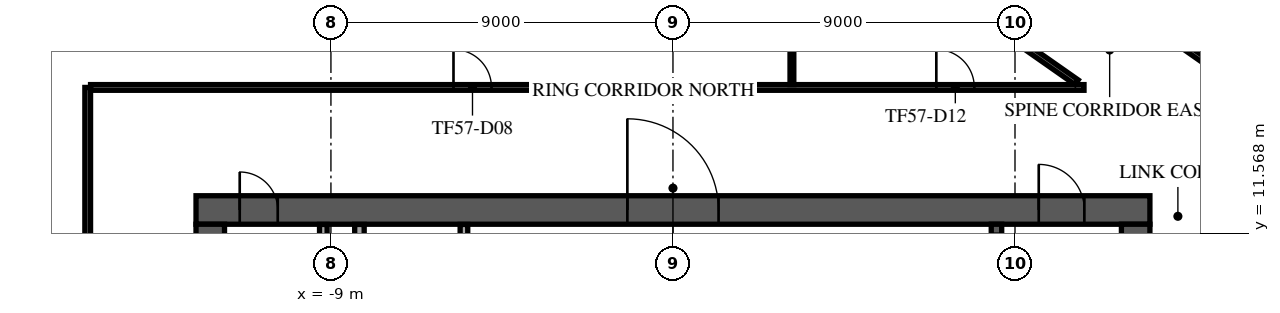
"""IFC4 building model, lengths in metres.
Left out: names, types, materials, properties, quantities, classifications, styles, units other than length and angle.
Written with IfcOpenShell. Run it as: python <this file> out.ifc"""

import sys

from ifc_helpers import new_model, si_unit, direction, frame, frame_2d, origin, place, context, subcontext, project, spatial, rectangle, extrude, element, fill, save


model = new_model("IFC4")
c1 = context("Model", 3, precision=1e-05, world=origin(), true_north=direction((0.0, 1.0)))
c2 = subcontext(c1, "Body", "Model", "MODEL_VIEW")
j1 = project(units=[si_unit("LENGTHUNIT", "METRE"), si_unit("PLANEANGLEUNIT", "RADIAN")], contexts=[c1])
p1 = place(None, origin())
s1 = spatial("IfcSite", under=j1, at=p1, CompositionType="ELEMENT")
p2 = place(p1, origin())
s2 = spatial("IfcBuilding", under=s1, at=p2, CompositionType="ELEMENT")
p3 = place(p2, frame((0.0, 0.0, 246.9)))
s3 = spatial("IfcBuildingStorey", under=s2, at=p3, CompositionType="ELEMENT", Elevation=246.9)
p4 = place(p3, frame((-12.55, 12.175, 0.0), z_axis=(0.0, 0.0, 1.0), x_axis=(1.0, 0.0, 0.0)))
e1 = element("IfcWall", 1, at=p4, inside=s3, PredefinedType="SHEAR", context=c2, shape_type="SweptSolid", body=[
    extrude(rectangle(XDim=25.1, YDim=0.75, at=frame_2d((12.55, 0.0))), origin(), (0.0, 0.0, 1.0), 3.64),
])
p5 = place(p4, frame((11.35, 0.0, 0.0)))
e2 = element("IfcOpeningElement", 2, at=p5, cuts=e1, PredefinedType="OPENING", context=c2, shape_type="SweptSolid", body=[
    extrude(rectangle(XDim=2.4, YDim=2.4, at=frame_2d((1.2, 1.2))), frame((0.0, 0.385, 0.0), z_axis=(0.0, -1.0, 0.0), x_axis=(1.0, 0.0, 0.0)), (0.0, 0.0, 1.0), 0.77),
])
p6 = place(p4, frame((22.175, 0.0, 0.0)))
e3 = element("IfcOpeningElement", 3, at=p6, cuts=e1, PredefinedType="OPENING", context=c2, shape_type="SweptSolid", body=[
    extrude(rectangle(XDim=1.2, YDim=2.1, at=frame_2d((0.6, 1.05))), frame((0.0, 0.385, 0.0), z_axis=(0.0, -1.0, 0.0), x_axis=(1.0, 0.0, 0.0)), (0.0, 0.0, 1.0), 0.77),
])
p7 = place(p4, frame((1.15, 0.0, 0.0)))
e4 = element("IfcOpeningElement", 4, at=p7, cuts=e1, PredefinedType="OPENING", context=c2, shape_type="SweptSolid", body=[
    extrude(rectangle(XDim=1.0, YDim=2.1, at=frame_2d((0.5, 1.05))), frame((0.0, 0.385, 0.0), z_axis=(0.0, -1.0, 0.0), x_axis=(1.0, 0.0, 0.0)), (0.0, 0.0, 1.0), 0.77),
])
p8 = place(p3, frame((12.175, -11.8, 0.0), z_axis=(0.0, 0.0, 1.0), x_axis=(0.0, 1.0, 0.0)))
e5 = element("IfcWall", 5, at=p8, inside=s3, PredefinedType="SHEAR", context=c2, shape_type="SweptSolid", body=[
    extrude(rectangle(XDim=23.6, YDim=0.75, at=frame_2d((11.8, 0.0))), origin(), (0.0, 0.0, 1.0), 3.64),
])
p9 = place(p8, frame((10.6, 0.0, 0.0)))
e6 = element("IfcOpeningElement", 6, at=p9, cuts=e5, PredefinedType="OPENING", context=c2, shape_type="SweptSolid", body=[
    extrude(rectangle(XDim=2.4, YDim=2.4, at=frame_2d((1.2, 1.2))), frame((0.0, 0.385, 0.0), z_axis=(0.0, -1.0, 0.0), x_axis=(1.0, 0.0, 0.0)), (0.0, 0.0, 1.0), 0.77),
])
p10 = place(p3, frame((-12.175, -11.8, 0.0), z_axis=(0.0, 0.0, 1.0), x_axis=(0.0, 1.0, 0.0)))
e7 = element("IfcWall", 7, at=p10, inside=s3, PredefinedType="SHEAR", context=c2, shape_type="SweptSolid", body=[
    extrude(rectangle(XDim=23.6, YDim=0.75, at=frame_2d((11.8, 0.0))), origin(), (0.0, 0.0, 1.0), 3.64),
])
p11 = place(p10, frame((10.6, 0.0, 0.0)))
e8 = element("IfcOpeningElement", 8, at=p11, cuts=e7, PredefinedType="OPENING", context=c2, shape_type="SweptSolid", body=[
    extrude(rectangle(XDim=2.4, YDim=2.4, at=frame_2d((1.2, 1.2))), frame((0.0, 0.385, 0.0), z_axis=(0.0, -1.0, 0.0), x_axis=(1.0, 0.0, 0.0)), (0.0, 0.0, 1.0), 0.77),
])
p12 = place(p3, frame((8.512, 4.55, 0.0), z_axis=(0.0, 0.0, 1.0), x_axis=(0.0, 1.0, 0.0)))
e9 = element("IfcWall", 9, at=p12, inside=s3, PredefinedType="SOLIDWALL", context=c2, shape_type="SweptSolid", body=[
    extrude(rectangle(XDim=7.25, YDim=0.275, at=frame_2d((3.625, 0.0))), origin(), (0.0, 0.0, 1.0), 3.64),
])
p13 = place(p12, frame((6.0, 0.0, 0.0)))
e10 = element("IfcOpeningElement", 10, at=p13, cuts=e9, PredefinedType="OPENING", context=c2, shape_type="SweptSolid", body=[
    extrude(rectangle(XDim=1.0, YDim=2.1, at=frame_2d((0.5, 1.05))), frame((0.0, 0.147, 0.0), z_axis=(0.0, -1.0, 0.0), x_axis=(1.0, 0.0, 0.0)), (0.0, 0.0, 1.0), 0.295),
])
p14 = place(p3, frame((-9.2, 4.78, 0.0), z_axis=(0.0, 0.0, 1.0), x_axis=(0.0, 1.0, 0.0)))
e11 = element("IfcWall", 11, at=p14, inside=s3, PredefinedType="PARTITIONING", context=c2, shape_type="SweptSolid", body=[
    extrude(rectangle(XDim=7.015, YDim=0.2, at=frame_2d((3.507, 0.0))), origin(), (0.0, 0.0, 1.0), 3.64),
])
p15 = place(p14, frame((2.92, 0.0, 0.0)))
e12 = element("IfcOpeningElement", 12, at=p15, cuts=e11, PredefinedType="OPENING", context=c2, shape_type="SweptSolid", body=[
    extrude(rectangle(XDim=1.0, YDim=2.1, at=frame_2d((0.5, 1.05))), frame((0.0, 0.11, 0.0), z_axis=(0.0, -1.0, 0.0), x_axis=(1.0, 0.0, 0.0)), (0.0, 0.0, 1.0), 0.22),
])
p16 = place(p3, frame((-8.25, 8.805, 0.0), z_axis=(0.0, 0.0, 1.0), x_axis=(0.0, 1.0, 0.0)))
e13 = element("IfcWall", 13, at=p16, inside=s3, PredefinedType="PARTITIONING", context=c2, shape_type="SweptSolid", body=[
    extrude(rectangle(XDim=2.99, YDim=0.25, at=frame_2d((1.495, 0.0))), origin(), (0.0, 0.0, 1.0), 3.64),
])
p17 = place(p16, frame((0.895, 0.0, 0.0)))
e14 = element("IfcOpeningElement", 14, at=p17, cuts=e13, PredefinedType="OPENING", context=c2, shape_type="SweptSolid", body=[
    extrude(rectangle(XDim=1.0, YDim=2.1, at=frame_2d((0.5, 1.05))), frame((0.0, 0.135, 0.0), z_axis=(0.0, -1.0, 0.0), x_axis=(1.0, 0.0, 0.0)), (0.0, 0.0, 1.0), 0.27),
])
p18 = place(p3, frame((-5.5, 8.805, 0.0), z_axis=(0.0, 0.0, 1.0), x_axis=(0.0, 1.0, 0.0)))
e15 = element("IfcWall", 15, at=p18, inside=s3, PredefinedType="PARTITIONING", context=c2, shape_type="SweptSolid", body=[
    extrude(rectangle(XDim=2.99, YDim=0.2, at=frame_2d((1.495, 0.0))), origin(), (0.0, 0.0, 1.0), 3.64),
])
p19 = place(p18, frame((0.532, 0.0, 0.0)))
e16 = element("IfcOpeningElement", 16, at=p19, cuts=e15, PredefinedType="OPENING", context=c2, shape_type="SweptSolid", body=[
    extrude(rectangle(XDim=1.8, YDim=2.1, at=frame_2d((0.9, 1.05))), frame((0.0, 0.11, 0.0), z_axis=(0.0, -1.0, 0.0), x_axis=(1.0, 0.0, 0.0)), (0.0, 0.0, 1.0), 0.22),
])
p20 = place(p3, frame((-5.115, 33.491, 0.0), z_axis=(0.0, 0.0, 1.0), x_axis=(-0.57357740375, -0.819151366908, 0.0)))
e17 = element("IfcWall", 17, at=p20, inside=s3, PredefinedType="STANDARD", context=c2, shape_type="SweptSolid", body=[
    extrude(rectangle(XDim=48.843, YDim=0.6, at=frame_2d((24.422, 0.0))), origin(), (0.0, 0.0, 1.0), 3.64),
])
p21 = place(p20, frame((1.22, 0.0, 0.9)))
e18 = element("IfcOpeningElement", 18, at=p21, cuts=e17, PredefinedType="OPENING", context=c2, shape_type="SweptSolid", body=[
    extrude(rectangle(XDim=2.0, YDim=2.1, at=frame_2d((1.0, 1.05))), frame((0.0, 0.31, 0.0), z_axis=(0.0, -1.0, 0.0), x_axis=(1.0, 0.0, 0.0)), (0.0, 0.0, 1.0), 0.62),
])
p22 = place(p20, frame((5.66, 0.0, 0.9)))
e19 = element("IfcOpeningElement", 19, at=p22, cuts=e17, PredefinedType="OPENING", context=c2, shape_type="SweptSolid", body=[
    extrude(rectangle(XDim=2.0, YDim=2.1, at=frame_2d((1.0, 1.05))), frame((0.0, 0.31, 0.0), z_axis=(0.0, -1.0, 0.0), x_axis=(1.0, 0.0, 0.0)), (0.0, 0.0, 1.0), 0.62),
])
p23 = place(p20, frame((10.101, 0.0, 0.9)))
e20 = element("IfcOpeningElement", 20, at=p23, cuts=e17, PredefinedType="OPENING", context=c2, shape_type="SweptSolid", body=[
    extrude(rectangle(XDim=2.0, YDim=2.1, at=frame_2d((1.0, 1.05))), frame((0.0, 0.31, 0.0), z_axis=(0.0, -1.0, 0.0), x_axis=(1.0, 0.0, 0.0)), (0.0, 0.0, 1.0), 0.62),
])
p24 = place(p20, frame((14.541, 0.0, 0.9)))
e21 = element("IfcOpeningElement", 21, at=p24, cuts=e17, PredefinedType="OPENING", context=c2, shape_type="SweptSolid", body=[
    extrude(rectangle(XDim=2.0, YDim=2.1, at=frame_2d((1.0, 1.05))), frame((0.0, 0.31, 0.0), z_axis=(0.0, -1.0, 0.0), x_axis=(1.0, 0.0, 0.0)), (0.0, 0.0, 1.0), 0.62),
])
p25 = place(p20, frame((18.981, 0.0, 0.9)))
e22 = element("IfcOpeningElement", 22, at=p25, cuts=e17, PredefinedType="OPENING", context=c2, shape_type="SweptSolid", body=[
    extrude(rectangle(XDim=2.0, YDim=2.1, at=frame_2d((1.0, 1.05))), frame((0.0, 0.31, 0.0), z_axis=(0.0, -1.0, 0.0), x_axis=(1.0, 0.0, 0.0)), (0.0, 0.0, 1.0), 0.62),
])
p26 = place(p20, frame((23.422, 0.0, 0.9)))
e23 = element("IfcOpeningElement", 23, at=p26, cuts=e17, PredefinedType="OPENING", context=c2, shape_type="SweptSolid", body=[
    extrude(rectangle(XDim=2.0, YDim=2.1, at=frame_2d((1.0, 1.05))), frame((0.0, 0.31, 0.0), z_axis=(0.0, -1.0, 0.0), x_axis=(1.0, 0.0, 0.0)), (0.0, 0.0, 1.0), 0.62),
])
p27 = place(p20, frame((27.862, 0.0, 0.9)))
e24 = element("IfcOpeningElement", 24, at=p27, cuts=e17, PredefinedType="OPENING", context=c2, shape_type="SweptSolid", body=[
    extrude(rectangle(XDim=2.0, YDim=2.1, at=frame_2d((1.0, 1.05))), frame((0.0, 0.31, 0.0), z_axis=(0.0, -1.0, 0.0), x_axis=(1.0, 0.0, 0.0)), (0.0, 0.0, 1.0), 0.62),
])
p28 = place(p20, frame((32.302, 0.0, 0.9)))
e25 = element("IfcOpeningElement", 25, at=p28, cuts=e17, PredefinedType="OPENING", context=c2, shape_type="SweptSolid", body=[
    extrude(rectangle(XDim=2.0, YDim=2.1, at=frame_2d((1.0, 1.05))), frame((0.0, 0.31, 0.0), z_axis=(0.0, -1.0, 0.0), x_axis=(1.0, 0.0, 0.0)), (0.0, 0.0, 1.0), 0.62),
])
p29 = place(p20, frame((36.742, 0.0, 0.9)))
e26 = element("IfcOpeningElement", 26, at=p29, cuts=e17, PredefinedType="OPENING", context=c2, shape_type="SweptSolid", body=[
    extrude(rectangle(XDim=2.0, YDim=2.1, at=frame_2d((1.0, 1.05))), frame((0.0, 0.31, 0.0), z_axis=(0.0, -1.0, 0.0), x_axis=(1.0, 0.0, 0.0)), (0.0, 0.0, 1.0), 0.62),
])
p30 = place(p20, frame((41.183, 0.0, 0.9)))
e27 = element("IfcOpeningElement", 27, at=p30, cuts=e17, PredefinedType="OPENING", context=c2, shape_type="SweptSolid", body=[
    extrude(rectangle(XDim=2.0, YDim=2.1, at=frame_2d((1.0, 1.05))), frame((0.0, 0.31, 0.0), z_axis=(0.0, -1.0, 0.0), x_axis=(1.0, 0.0, 0.0)), (0.0, 0.0, 1.0), 0.62),
])
p31 = place(p20, frame((45.623, 0.0, 0.9)))
e28 = element("IfcOpeningElement", 28, at=p31, cuts=e17, PredefinedType="OPENING", context=c2, shape_type="SweptSolid", body=[
    extrude(rectangle(XDim=2.0, YDim=2.1, at=frame_2d((1.0, 1.05))), frame((0.0, 0.31, 0.0), z_axis=(0.0, -1.0, 0.0), x_axis=(1.0, 0.0, 0.0)), (0.0, 0.0, 1.0), 0.62),
])
p32 = place(p3, frame((31.815, 13.98, 0.0), z_axis=(0.0, 0.0, 1.0), x_axis=(-0.819152162902, 0.573576266955, 0.0)))
e29 = element("IfcWall", 29, at=p32, inside=s3, PredefinedType="STANDARD", context=c2, shape_type="SweptSolid", body=[
    extrude(rectangle(XDim=36.243, YDim=0.6, at=frame_2d((18.122, 0.0))), origin(), (0.0, 0.0, 1.0), 3.64),
])
p33 = place(p32, frame((1.215, 0.0, 0.9)))
e30 = element("IfcOpeningElement", 30, at=p33, cuts=e29, PredefinedType="OPENING", context=c2, shape_type="SweptSolid", body=[
    extrude(rectangle(XDim=2.1, YDim=2.1, at=frame_2d((1.05, 1.05))), frame((0.0, 0.31, 0.0), z_axis=(0.0, -1.0, 0.0), x_axis=(1.0, 0.0, 0.0)), (0.0, 0.0, 1.0), 0.62),
])
p34 = place(p32, frame((5.746, 0.0, 0.9)))
e31 = element("IfcOpeningElement", 31, at=p34, cuts=e29, PredefinedType="OPENING", context=c2, shape_type="SweptSolid", body=[
    extrude(rectangle(XDim=2.1, YDim=2.1, at=frame_2d((1.05, 1.05))), frame((0.0, 0.31, 0.0), z_axis=(0.0, -1.0, 0.0), x_axis=(1.0, 0.0, 0.0)), (0.0, 0.0, 1.0), 0.62),
])
p35 = place(p32, frame((10.276, 0.0, 0.9)))
e32 = element("IfcOpeningElement", 32, at=p35, cuts=e29, PredefinedType="OPENING", context=c2, shape_type="SweptSolid", body=[
    extrude(rectangle(XDim=2.1, YDim=2.1, at=frame_2d((1.05, 1.05))), frame((0.0, 0.31, 0.0), z_axis=(0.0, -1.0, 0.0), x_axis=(1.0, 0.0, 0.0)), (0.0, 0.0, 1.0), 0.62),
])
p36 = place(p32, frame((14.806, 0.0, 0.9)))
e33 = element("IfcOpeningElement", 33, at=p36, cuts=e29, PredefinedType="OPENING", context=c2, shape_type="SweptSolid", body=[
    extrude(rectangle(XDim=2.1, YDim=2.1, at=frame_2d((1.05, 1.05))), frame((0.0, 0.31, 0.0), z_axis=(0.0, -1.0, 0.0), x_axis=(1.0, 0.0, 0.0)), (0.0, 0.0, 1.0), 0.62),
])
p37 = place(p32, frame((19.337, 0.0, 0.9)))
e34 = element("IfcOpeningElement", 34, at=p37, cuts=e29, PredefinedType="OPENING", context=c2, shape_type="SweptSolid", body=[
    extrude(rectangle(XDim=2.1, YDim=2.1, at=frame_2d((1.05, 1.05))), frame((0.0, 0.31, 0.0), z_axis=(0.0, -1.0, 0.0), x_axis=(1.0, 0.0, 0.0)), (0.0, 0.0, 1.0), 0.62),
])
p38 = place(p32, frame((23.867, 0.0, 0.9)))
e35 = element("IfcOpeningElement", 35, at=p38, cuts=e29, PredefinedType="OPENING", context=c2, shape_type="SweptSolid", body=[
    extrude(rectangle(XDim=2.1, YDim=2.1, at=frame_2d((1.05, 1.05))), frame((0.0, 0.31, 0.0), z_axis=(0.0, -1.0, 0.0), x_axis=(1.0, 0.0, 0.0)), (0.0, 0.0, 1.0), 0.62),
])
p39 = place(p32, frame((28.398, 0.0, 0.9)))
e36 = element("IfcOpeningElement", 36, at=p39, cuts=e29, PredefinedType="OPENING", context=c2, shape_type="SweptSolid", body=[
    extrude(rectangle(XDim=2.1, YDim=2.1, at=frame_2d((1.05, 1.05))), frame((0.0, 0.31, 0.0), z_axis=(0.0, -1.0, 0.0), x_axis=(1.0, 0.0, 0.0)), (0.0, 0.0, 1.0), 0.62),
])
p40 = place(p32, frame((32.928, 0.0, 0.9)))
e37 = element("IfcOpeningElement", 37, at=p40, cuts=e29, PredefinedType="OPENING", context=c2, shape_type="SweptSolid", body=[
    extrude(rectangle(XDim=2.1, YDim=2.1, at=frame_2d((1.05, 1.05))), frame((0.0, 0.31, 0.0), z_axis=(0.0, -1.0, 0.0), x_axis=(1.0, 0.0, 0.0)), (0.0, 0.0, 1.0), 0.62),
])
p41 = place(p3, frame((-15.4, -12.046, 0.0), z_axis=(0.0, 0.0, 1.0), x_axis=(0.0, 1.0, 0.0)))
e38 = element("IfcWall", 38, at=p41, inside=s3, PredefinedType="PARTITIONING", context=c2, shape_type="SweptSolid", body=[
    extrude(rectangle(XDim=27.446, YDim=0.15, at=frame_2d((13.723, 0.0))), origin(), (0.0, 0.0, 1.0), 3.24),
])
p42 = place(p41, frame((12.961, 0.0, 0.0)))
e39 = element("IfcOpeningElement", 39, at=p42, cuts=e38, PredefinedType="OPENING", context=c2, shape_type="SweptSolid", body=[
    extrude(rectangle(XDim=1.0, YDim=2.1, at=frame_2d((0.5, 1.05))), frame((0.0, 0.085, 0.0), z_axis=(0.0, -1.0, 0.0), x_axis=(1.0, 0.0, 0.0)), (0.0, 0.0, 1.0), 0.17),
])
p43 = place(p3, frame((-15.325, 15.4, 0.0), z_axis=(0.0, 0.0, 1.0), x_axis=(1.0, 0.0, 0.0)))
e40 = element("IfcWall", 40, at=p43, inside=s3, PredefinedType="PARTITIONING", context=c2, shape_type="SweptSolid", body=[
    extrude(rectangle(XDim=26.141, YDim=0.15, at=frame_2d((13.07, 0.0))), origin(), (0.0, 0.0, 1.0), 3.24),
])
p44 = place(p43, frame((9.55, 0.0, 0.0)))
e41 = element("IfcOpeningElement", 41, at=p44, cuts=e40, PredefinedType="OPENING", context=c2, shape_type="SweptSolid", body=[
    extrude(rectangle(XDim=1.0, YDim=2.1, at=frame_2d((0.5, 1.05))), frame((0.0, 0.085, 0.0), z_axis=(0.0, -1.0, 0.0), x_axis=(1.0, 0.0, 0.0)), (0.0, 0.0, 1.0), 0.17),
])
p45 = place(p43, frame((22.255, 0.0, 0.0)))
e42 = element("IfcOpeningElement", 42, at=p45, cuts=e40, PredefinedType="OPENING", context=c2, shape_type="SweptSolid", body=[
    extrude(rectangle(XDim=1.0, YDim=2.1, at=frame_2d((0.5, 1.05))), frame((0.0, 0.085, 0.0), z_axis=(0.0, -1.0, 0.0), x_axis=(1.0, 0.0, 0.0)), (0.0, 0.0, 1.0), 0.17),
])
p46 = place(p3, frame((-3.266, 25.26, 0.0), z_axis=(0.0, 0.0, 1.0), x_axis=(0.819150723298, -0.573578322917, 0.0)))
e43 = element("IfcWall", 43, at=p46, inside=s3, PredefinedType="PARTITIONING", context=c2, shape_type="SweptSolid", body=[
    extrude(rectangle(XDim=16.953, YDim=0.15, at=frame_2d((8.476, 0.0))), origin(), (0.0, 0.0, 1.0), 3.24),
])
p47 = place(p46, frame((2.55, 0.0, 0.0)))
e44 = element("IfcOpeningElement", 44, at=p47, cuts=e43, PredefinedType="OPENING", context=c2, shape_type="SweptSolid", body=[
    extrude(rectangle(XDim=1.8, YDim=2.1, at=frame_2d((0.9, 1.05))), frame((0.0, 0.085, 0.0), z_axis=(0.0, -1.0, 0.0), x_axis=(1.0, 0.0, 0.0)), (0.0, 0.0, 1.0), 0.17),
])
p48 = place(p3, frame((-1.89, 27.226, 0.0), z_axis=(0.0, 0.0, 1.0), x_axis=(0.819163235761, -0.573560452941, 0.0)))
e45 = element("IfcWall", 45, at=p48, inside=s3, PredefinedType="PARTITIONING", context=c2, shape_type="SweptSolid", body=[
    extrude(rectangle(XDim=34.403, YDim=0.15, at=frame_2d((17.202, 0.0))), origin(), (0.0, 0.0, 1.0), 3.24),
])
p49 = place(p48, frame((7.427, 0.0, 0.0)))
e46 = element("IfcOpeningElement", 46, at=p49, cuts=e45, PredefinedType="OPENING", context=c2, shape_type="SweptSolid", body=[
    extrude(rectangle(XDim=1.0, YDim=2.1, at=frame_2d((0.5, 1.05))), frame((0.0, 0.085, 0.0), z_axis=(0.0, -1.0, 0.0), x_axis=(1.0, 0.0, 0.0)), (0.0, 0.0, 1.0), 0.17),
])
p50 = place(p48, frame((15.173, 0.0, 0.0)))
e47 = element("IfcOpeningElement", 47, at=p50, cuts=e45, PredefinedType="OPENING", context=c2, shape_type="SweptSolid", body=[
    extrude(rectangle(XDim=1.0, YDim=2.1, at=frame_2d((0.5, 1.05))), frame((0.0, 0.085, 0.0), z_axis=(0.0, -1.0, 0.0), x_axis=(1.0, 0.0, 0.0)), (0.0, 0.0, 1.0), 0.17),
])
p51 = place(p48, frame((19.273, 0.0, 0.0)))
e48 = element("IfcOpeningElement", 48, at=p51, cuts=e45, PredefinedType="OPENING", context=c2, shape_type="SweptSolid", body=[
    extrude(rectangle(XDim=1.0, YDim=2.1, at=frame_2d((0.5, 1.05))), frame((0.0, 0.085, 0.0), z_axis=(0.0, -1.0, 0.0), x_axis=(1.0, 0.0, 0.0)), (0.0, 0.0, 1.0), 0.17),
])
p52 = place(p3, frame((3.13, 15.475, 0.0), z_axis=(0.0, 0.0, 1.0), x_axis=(0.0, 1.0, 0.0)))
e49 = element("IfcWall", 49, at=p52, inside=s3, PredefinedType="PARTITIONING", context=c2, shape_type="SweptSolid", body=[
    extrude(rectangle(XDim=3.731, YDim=0.1, at=frame_2d((1.865, 0.0))), origin(), (0.0, 0.0, 1.0), 3.64),
])
p53 = place(p5, origin())
e50 = element("IfcDoor", 50, at=p53, inside=s3, OperationType="SINGLE_SWING_LEFT", PredefinedType="DOOR", context=c2, shape_type="SweptSolid", body=[
    extrude(rectangle(XDim=2.4, YDim=2.4, at=frame_2d((1.2, 1.2))), frame((0.0, 0.025, 0.0), z_axis=(0.0, -1.0, 0.0), x_axis=(1.0, 0.0, 0.0)), (0.0, 0.0, 1.0), 0.05),
])
fill(e2, e50)
p54 = place(p6, origin())
e51 = element("IfcDoor", 51, at=p54, inside=s3, OperationType="SINGLE_SWING_LEFT", PredefinedType="DOOR", context=c2, shape_type="SweptSolid", body=[
    extrude(rectangle(XDim=1.2, YDim=2.1, at=frame_2d((0.6, 1.05))), frame((0.0, 0.025, 0.0), z_axis=(0.0, -1.0, 0.0), x_axis=(1.0, 0.0, 0.0)), (0.0, 0.0, 1.0), 0.05),
])
fill(e3, e51)
p55 = place(p7, origin())
e52 = element("IfcDoor", 52, at=p55, inside=s3, OperationType="SINGLE_SWING_LEFT", PredefinedType="DOOR", context=c2, shape_type="SweptSolid", body=[
    extrude(rectangle(XDim=1.0, YDim=2.1, at=frame_2d((0.5, 1.05))), frame((0.0, 0.025, 0.0), z_axis=(0.0, -1.0, 0.0), x_axis=(1.0, 0.0, 0.0)), (0.0, 0.0, 1.0), 0.05),
])
fill(e4, e52)
p56 = place(p25, origin())
e53 = element("IfcWindow", 53, at=p56, inside=s3, PartitioningType="SINGLE_PANEL", PredefinedType="WINDOW", context=c2, shape_type="SweptSolid", body=[
    extrude(rectangle(XDim=2.0, YDim=2.1, at=frame_2d((1.0, 1.05))), frame((0.0, 0.03, 0.0), z_axis=(0.0, -1.0, 0.0), x_axis=(1.0, 0.0, 0.0)), (0.0, 0.0, 1.0), 0.06),
])
fill(e22, e53)
p57 = place(p44, origin())
e54 = element("IfcDoor", 54, at=p57, inside=s3, OperationType="SINGLE_SWING_RIGHT", PredefinedType="DOOR", context=c2, shape_type="SweptSolid", body=[
    extrude(rectangle(XDim=1.0, YDim=2.1, at=frame_2d((0.5, 1.05))), frame((0.0, 0.025, 0.0), z_axis=(0.0, -1.0, 0.0), x_axis=(1.0, 0.0, 0.0)), (0.0, 0.0, 1.0), 0.05),
])
fill(e41, e54)
p58 = place(p45, origin())
e55 = element("IfcDoor", 55, at=p58, inside=s3, OperationType="SINGLE_SWING_LEFT", PredefinedType="DOOR", context=c2, shape_type="SweptSolid", body=[
    extrude(rectangle(XDim=1.0, YDim=2.1, at=frame_2d((0.5, 1.05))), frame((0.0, 0.025, 0.0), z_axis=(0.0, -1.0, 0.0), x_axis=(1.0, 0.0, 0.0)), (0.0, 0.0, 1.0), 0.05),
])
fill(e42, e55)
p59 = place(p51, origin())
e56 = element("IfcDoor", 56, at=p59, inside=s3, OperationType="SINGLE_SWING_LEFT", PredefinedType="DOOR", context=c2, shape_type="SweptSolid", body=[
    extrude(rectangle(XDim=1.0, YDim=2.1, at=frame_2d((0.5, 1.05))), frame((0.0, 0.025, 0.0), z_axis=(0.0, -1.0, 0.0), x_axis=(1.0, 0.0, 0.0)), (0.0, 0.0, 1.0), 0.05),
])
fill(e48, e56)
save(model, sys.argv[1])
